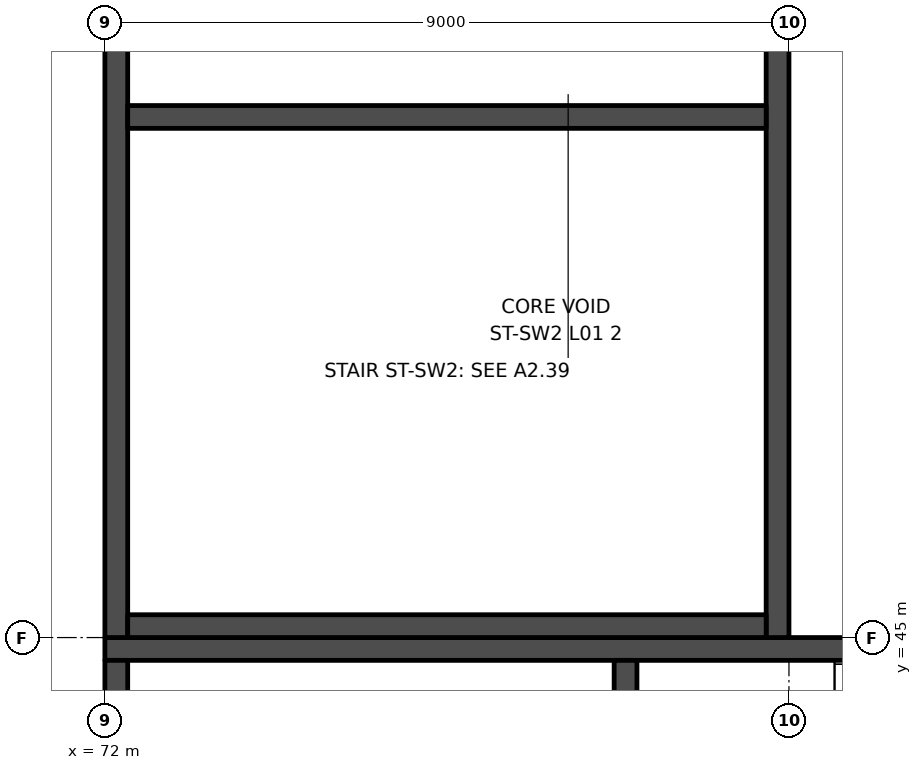
"""IFC4 building model, lengths in metres.
Left out: names, types, materials, properties, quantities, classifications, styles, units other than length and angle.
Written with IfcOpenShell. Run it as: python <this file> out.ifc"""

import sys

from ifc_helpers import new_model, si_unit, direction, frame, frame_2d, origin, place, context, subcontext, project, spatial, rectangle, extrude, element, save


model = new_model("IFC4")
c1 = context("Model", 3, precision=1e-05, world=origin(), true_north=direction((0.0, 1.0)))
c2 = subcontext(c1, "Body", "Model", "MODEL_VIEW")
j1 = project(units=[si_unit("LENGTHUNIT", "METRE"), si_unit("PLANEANGLEUNIT", "RADIAN")], contexts=[c1])
p1 = place(None, origin())
s1 = spatial("IfcSite", under=j1, at=p1, CompositionType="ELEMENT")
p2 = place(p1, origin())
s2 = spatial("IfcBuilding", under=s1, at=p2, CompositionType="ELEMENT")
p3 = place(p2, frame((0.0, 0.0, 7.0)))
s3 = spatial("IfcBuildingStorey", under=s2, at=p3, CompositionType="ELEMENT", Elevation=7.0)
p4 = place(p3, frame((90.25, 44.85, 0.0), z_axis=(0.0, 0.0, 1.0), x_axis=(-1.0, 0.0, 0.0)))
e1 = element("IfcWall", 1, at=p4, inside=s3, PredefinedType="SHEAR", context=c2, shape_type="SweptSolid", body=[
    extrude(rectangle(XDim=18.25, YDim=0.3, at=frame_2d((9.125, 0.0))), origin(), (0.0, 0.0, 1.0), 4.5),
])
p5 = place(p4, frame((1.75, 0.0, 0.0)))
e2 = element("IfcOpeningElement", 2, at=p5, cuts=e1, PredefinedType="OPENING", context=c2, shape_type="SweptSolid", body=[
    extrude(rectangle(XDim=1.2, YDim=2.1, at=frame_2d((0.6, 1.05))), frame((0.0, 0.16, 0.0), z_axis=(0.0, -1.0, 0.0), x_axis=(1.0, 0.0, 0.0)), (0.0, 0.0, 1.0), 0.32),
])
for number, where, z_axis, x_axis in (
    (3, (72.15, 44.7, 0.0), (0.0, 0.0, 1.0), (0.0, -1.0, 0.0)),
    (4, (78.85, 44.7, 0.0), (0.0, 0.0, 1.0), (0.0, -1.0, 0.0)),
):
    element("IfcWall", number, at=place(p3, frame(where, z_axis=z_axis, x_axis=x_axis)), inside=s3, PredefinedType="SHEAR", context=c2, shape_type="SweptSolid", body=[
        extrude(rectangle(XDim=8.4, YDim=0.3, at=frame_2d((4.2, 0.0))), origin(), (0.0, 0.0, 1.0), 4.5),
    ])
p6 = place(p3, frame((80.85, 63.0, 0.0), z_axis=(0.0, 0.0, 1.0), x_axis=(0.0, -1.0, 0.0)))
e5 = element("IfcWall", 5, at=p6, inside=s3, PredefinedType="SHEAR", context=c2, shape_type="SweptSolid", body=[
    extrude(rectangle(XDim=18.0, YDim=0.3, at=frame_2d((9.0, 0.0))), origin(), (0.0, 0.0, 1.0), 4.5),
])
p7 = place(p6, frame((1.5, 0.0, 0.0)))
e6 = element("IfcOpeningElement", 6, at=p7, cuts=e5, PredefinedType="OPENING", context=c2, shape_type="SweptSolid", body=[
    extrude(rectangle(XDim=1.2, YDim=2.1, at=frame_2d((0.6, 1.05))), frame((0.0, 0.16, 0.0), z_axis=(0.0, -1.0, 0.0), x_axis=(1.0, 0.0, 0.0)), (0.0, 0.0, 1.0), 0.32),
])
p8 = place(p3, frame((72.15, 63.0, 0.0), z_axis=(0.0, 0.0, 1.0), x_axis=(0.0, -1.0, 0.0)))
e7 = element("IfcWall", 7, at=p8, inside=s3, PredefinedType="SHEAR", context=c2, shape_type="SweptSolid", body=[
    extrude(rectangle(XDim=18.0, YDim=0.3, at=frame_2d((9.0, 0.0))), origin(), (0.0, 0.0, 1.0), 4.5),
])
for number, where, z_axis, x_axis in (
    (8, (80.7, 45.15, 0.0), (0.0, 0.0, 1.0), (-1.0, 0.0, 0.0)),
    (9, (80.7, 51.85, 0.0), (0.0, 0.0, 1.0), (-1.0, 0.0, 0.0)),
):
    element("IfcWall", number, at=place(p3, frame(where, z_axis=z_axis, x_axis=x_axis)), inside=s3, PredefinedType="SHEAR", context=c2, shape_type="SweptSolid", body=[
        extrude(rectangle(XDim=8.4, YDim=0.3, at=frame_2d((4.2, 0.0))), origin(), (0.0, 0.0, 1.0), 4.5),
    ])
save(model, sys.argv[1])
